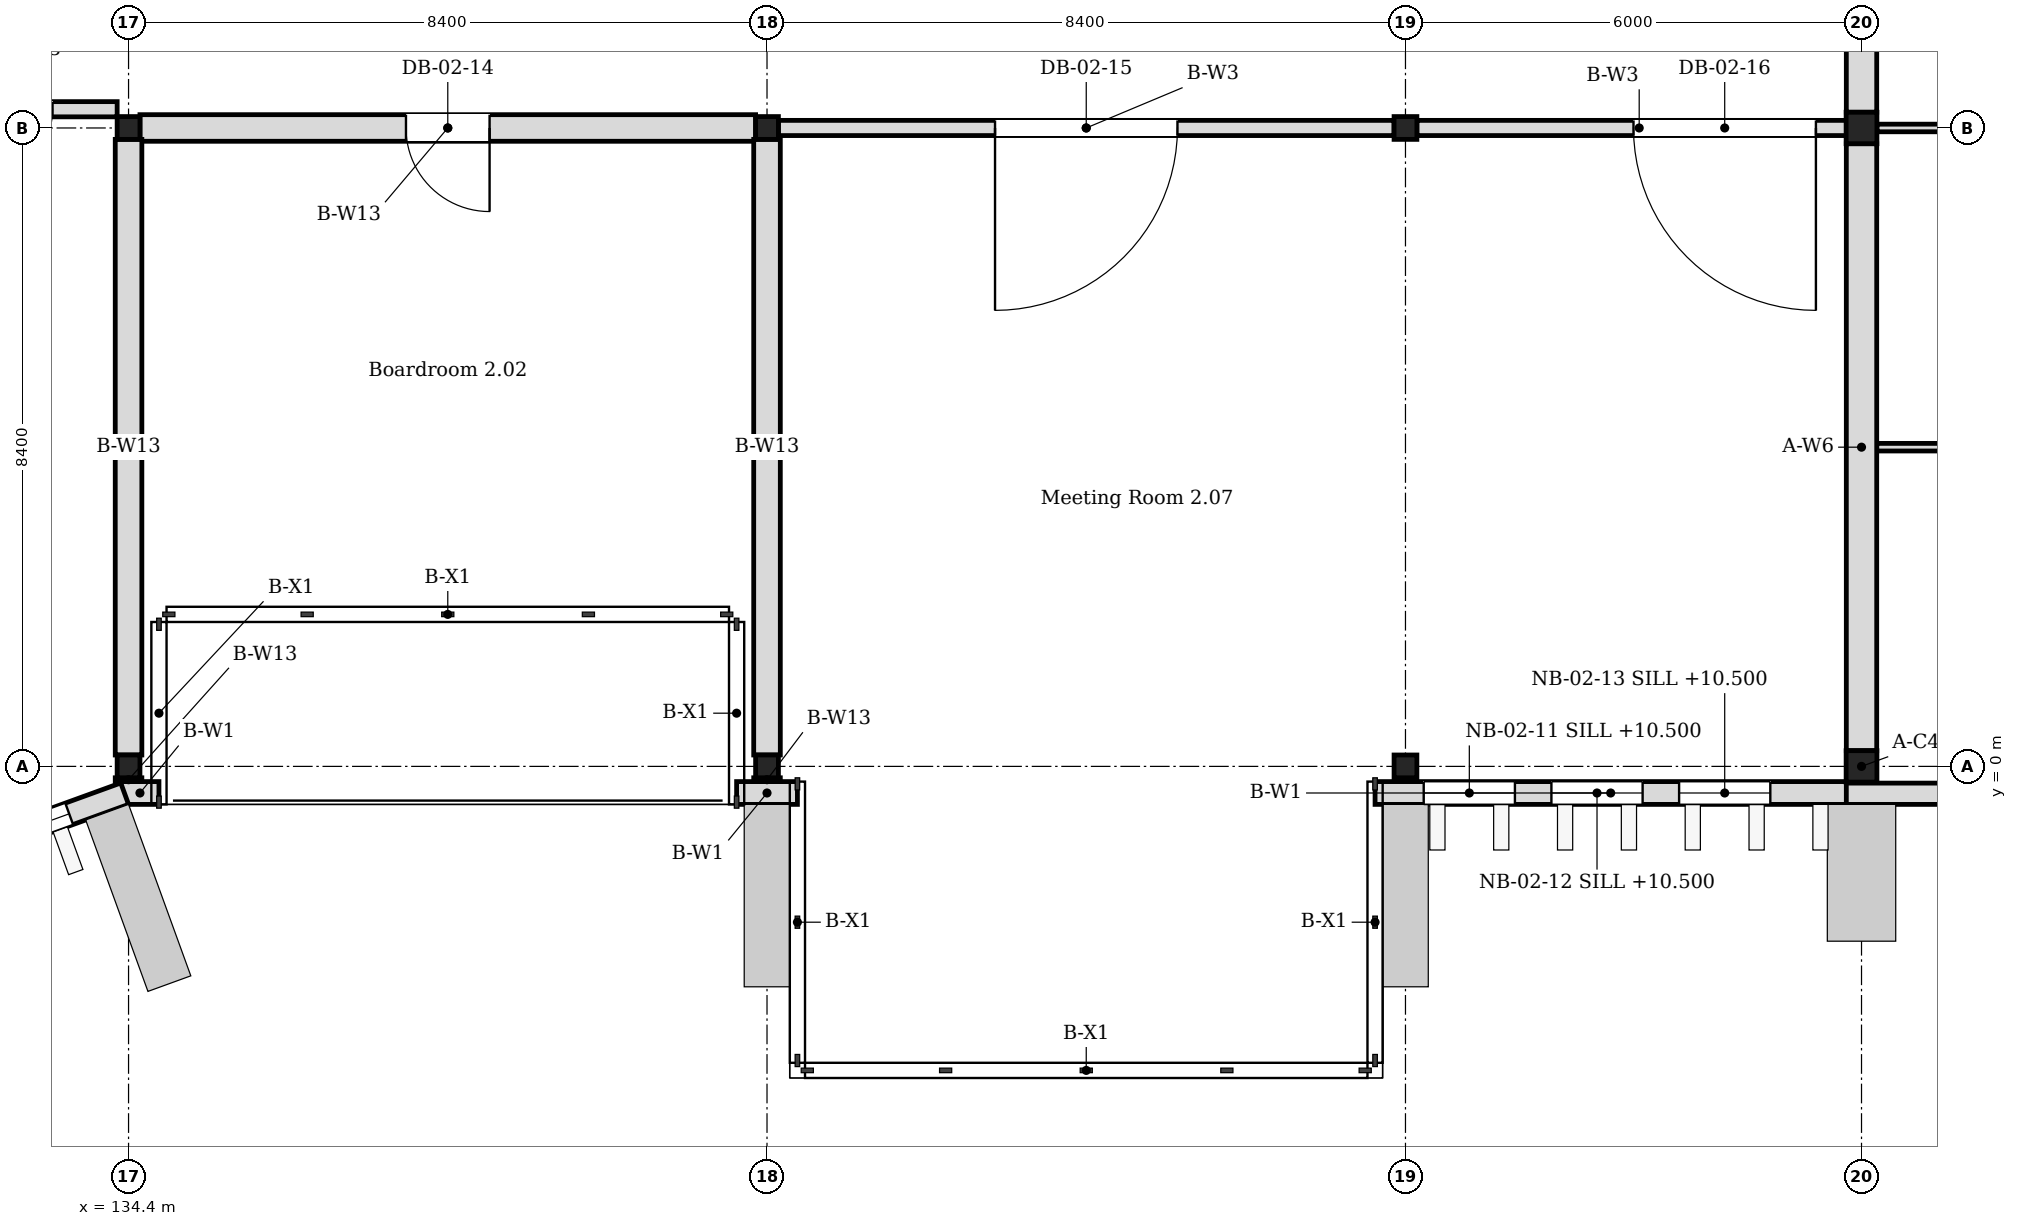
"""IFC4 building model, lengths in metres.
Left out: names, types, materials, properties, quantities, classifications, styles, units other than length and angle.
Written with IfcOpenShell. Run it as: python <this file> out.ifc"""

import sys

from ifc_helpers import new_model, si_unit, direction, frame, frame_2d, origin, origin_2d, place, context, subcontext, project, spatial, rectangle, i_section, extrude, element, fill, save


model = new_model("IFC4")
c1 = context("Model", 3, precision=1e-05, world=origin(), true_north=direction((0.0, 1.0)))
c2 = subcontext(c1, "Body", "Model", "MODEL_VIEW")
j1 = project(units=[si_unit("LENGTHUNIT", "METRE"), si_unit("PLANEANGLEUNIT", "RADIAN")], contexts=[c1])
p1 = place(None, origin())
s1 = spatial("IfcSite", under=j1, at=p1, CompositionType="ELEMENT")
p2 = place(p1, origin())
s2 = spatial("IfcBuilding", under=s1, at=p2, CompositionType="ELEMENT")
p3 = place(p2, frame((0.0, 0.0, 10.2)))
s3 = spatial("IfcBuildingStorey", under=s2, at=p3, CompositionType="ELEMENT", Elevation=10.2)
for number, where, z_axis, x_axis in (
    (1, (157.2, 0.0, 0.0), (0.0, 0.0, 1.0), (1.0, 0.0, 0.0)),
    (2, (157.2, 8.4, 0.0), (0.0, 0.0, 1.0), (1.0, 0.0, 0.0)),
):
    element("IfcColumn", number, at=place(p3, frame(where, z_axis=z_axis, x_axis=x_axis)), inside=s3, PredefinedType="COLUMN", context=c2, shape_type="SweptSolid", body=[
        extrude(i_section(OverallWidth=0.405, OverallDepth=0.414, WebThickness=0.018, FlangeThickness=0.028, FilletRadius=0.022, at=origin_2d()), origin(), (0.0, 0.0, 1.0), 4.2),
    ])
for number, where, z_axis, x_axis in (
    (3, (134.4, 0.0, 0.0), (0.0, 0.0, 1.0), (1.0, 0.0, 0.0)),
    (4, (134.4, 8.4, 0.0), (0.0, 0.0, 1.0), (1.0, 0.0, 0.0)),
    (5, (142.8, 0.0, 0.0), (0.0, 0.0, 1.0), (1.0, 0.0, 0.0)),
    (6, (142.8, 8.4, 0.0), (0.0, 0.0, 1.0), (1.0, 0.0, 0.0)),
    (7, (151.2, 0.0, 0.0), (0.0, 0.0, 1.0), (1.0, 0.0, 0.0)),
    (8, (151.2, 8.4, 0.0), (0.0, 0.0, 1.0), (1.0, 0.0, 0.0)),
):
    element("IfcColumn", number, at=place(p3, frame(where, z_axis=z_axis, x_axis=x_axis)), inside=s3, PredefinedType="COLUMN", context=c2, shape_type="SweptSolid", body=[
        extrude(i_section(OverallWidth=0.3, OverallDepth=0.3, WebThickness=0.01, FlangeThickness=0.015, FilletRadius=0.013, at=origin_2d()), origin(), (0.0, 0.0, 1.0), 4.2),
    ])
p4 = place(p3, frame((156.7, -0.36, 0.0), z_axis=(0.0, 0.0, 1.0), x_axis=(1.0, 0.0, 0.0)))
e9 = element("IfcWall", 9, at=p4, inside=s3, PredefinedType="SOLIDWALL", context=c2, shape_type="SweptSolid", body=[
    extrude(rectangle(XDim=20.2, YDim=0.28, at=frame_2d((10.1, 0.0))), origin(), (0.0, 0.0, 1.0), 4.05),
])
p5 = place(p4, frame((9.26, 0.0, 0.6)))
e10 = element("IfcOpeningElement", 10, at=p5, cuts=e9, PredefinedType="OPENING", context=c2, shape_type="SweptSolid", body=[
    extrude(rectangle(XDim=1.68, YDim=2.4, at=frame_2d((0.84, 1.2))), frame((0.0, 0.15, 0.0), z_axis=(0.0, -1.0, 0.0), x_axis=(1.0, 0.0, 0.0)), (0.0, 0.0, 1.0), 0.3),
])
p6 = place(p4, frame((3.34, 0.0, 0.6)))
e11 = element("IfcOpeningElement", 11, at=p6, cuts=e9, PredefinedType="OPENING", context=c2, shape_type="SweptSolid", body=[
    extrude(rectangle(XDim=2.52, YDim=2.4, at=frame_2d((1.26, 1.2))), frame((0.0, 0.15, 0.0), z_axis=(0.0, -1.0, 0.0), x_axis=(1.0, 0.0, 0.0)), (0.0, 0.0, 1.0), 0.3),
])
p7 = place(p3, frame((134.3, -0.35, 0.0), z_axis=(0.0, 0.0, 1.0), x_axis=(1.0, 0.0, 0.0)))
e12 = element("IfcWall", 12, at=p7, inside=s3, PredefinedType="SOLIDWALL", context=c2, shape_type="SweptSolid", body=[
    extrude(rectangle(XDim=0.5, YDim=0.3, at=frame_2d((0.25, 0.0))), origin(), (0.0, 0.0, 1.0), 4.05),
])
p8 = place(p3, frame((142.4, -0.35, 0.0), z_axis=(0.0, 0.0, 1.0), x_axis=(1.0, 0.0, 0.0)))
e13 = element("IfcWall", 13, at=p8, inside=s3, PredefinedType="SOLIDWALL", context=c2, shape_type="SweptSolid", body=[
    extrude(rectangle(XDim=0.8, YDim=0.3, at=frame_2d((0.4, 0.0))), origin(), (0.0, 0.0, 1.0), 4.05),
])
p9 = place(p3, frame((150.8, -0.35, 0.0), z_axis=(0.0, 0.0, 1.0), x_axis=(1.0, 0.0, 0.0)))
e14 = element("IfcWall", 14, at=p9, inside=s3, PredefinedType="SOLIDWALL", context=c2, shape_type="SweptSolid", body=[
    extrude(rectangle(XDim=6.2, YDim=0.3, at=frame_2d((3.1, 0.0))), origin(), (0.0, 0.0, 1.0), 4.05),
])
p10 = place(p9, frame((0.64, 0.0, 0.3)))
e15 = element("IfcOpeningElement", 15, at=p10, cuts=e14, PredefinedType="OPENING", context=c2, shape_type="SweptSolid", body=[
    extrude(rectangle(XDim=1.2, YDim=3.3, at=frame_2d((0.6, 1.65))), frame((0.0, 0.16, 0.0), z_axis=(0.0, -1.0, 0.0), x_axis=(1.0, 0.0, 0.0)), (0.0, 0.0, 1.0), 0.32),
])
p11 = place(p9, frame((2.32, 0.0, 0.3)))
e16 = element("IfcOpeningElement", 16, at=p11, cuts=e14, PredefinedType="OPENING", context=c2, shape_type="SweptSolid", body=[
    extrude(rectangle(XDim=1.2, YDim=3.3, at=frame_2d((0.6, 1.65))), frame((0.0, 0.16, 0.0), z_axis=(0.0, -1.0, 0.0), x_axis=(1.0, 0.0, 0.0)), (0.0, 0.0, 1.0), 0.32),
])
p12 = place(p9, frame((4.0, 0.0, 0.3)))
e17 = element("IfcOpeningElement", 17, at=p12, cuts=e14, PredefinedType="OPENING", context=c2, shape_type="SweptSolid", body=[
    extrude(rectangle(XDim=1.2, YDim=3.3, at=frame_2d((0.6, 1.65))), frame((0.0, 0.16, 0.0), z_axis=(0.0, -1.0, 0.0), x_axis=(1.0, 0.0, 0.0)), (0.0, 0.0, 1.0), 0.32),
])
p13 = place(p3, frame((126.05, -3.372, 0.0), z_axis=(0.0, 0.0, 1.0), x_axis=(0.939956409183, 0.3412945192, 0.0)))
e18 = element("IfcWall", 18, at=p13, inside=s3, PredefinedType="SOLIDWALL", context=c2, shape_type="SweptSolid", body=[
    extrude(rectangle(XDim=8.829, YDim=0.3, at=frame_2d((4.414, 0.0))), origin(), (0.0, 0.0, 1.0), 4.05),
])
p14 = place(p13, frame((0.132, 0.0, 0.3)))
e19 = element("IfcOpeningElement", 19, at=p14, cuts=e18, PredefinedType="OPENING", context=c2, shape_type="SweptSolid", body=[
    extrude(rectangle(XDim=1.2, YDim=3.3, at=frame_2d((0.6, 1.65))), frame((0.0, 0.16, 0.0), z_axis=(0.0, -1.0, 0.0), x_axis=(1.0, 0.0, 0.0)), (0.0, 0.0, 1.0), 0.32),
])
p15 = place(p13, frame((1.812, 0.0, 0.3)))
e20 = element("IfcOpeningElement", 20, at=p15, cuts=e18, PredefinedType="OPENING", context=c2, shape_type="SweptSolid", body=[
    extrude(rectangle(XDim=1.2, YDim=3.3, at=frame_2d((0.6, 1.65))), frame((0.0, 0.16, 0.0), z_axis=(0.0, -1.0, 0.0), x_axis=(1.0, 0.0, 0.0)), (0.0, 0.0, 1.0), 0.32),
])
p16 = place(p13, frame((3.492, 0.0, 0.3)))
e21 = element("IfcOpeningElement", 21, at=p16, cuts=e18, PredefinedType="OPENING", context=c2, shape_type="SweptSolid", body=[
    extrude(rectangle(XDim=1.2, YDim=3.3, at=frame_2d((0.6, 1.65))), frame((0.0, 0.16, 0.0), z_axis=(0.0, -1.0, 0.0), x_axis=(1.0, 0.0, 0.0)), (0.0, 0.0, 1.0), 0.32),
])
p17 = place(p13, frame((5.172, 0.0, 0.3)))
e22 = element("IfcOpeningElement", 22, at=p17, cuts=e18, PredefinedType="OPENING", context=c2, shape_type="SweptSolid", body=[
    extrude(rectangle(XDim=1.2, YDim=3.3, at=frame_2d((0.6, 1.65))), frame((0.0, 0.16, 0.0), z_axis=(0.0, -1.0, 0.0), x_axis=(1.0, 0.0, 0.0)), (0.0, 0.0, 1.0), 0.32),
])
p18 = place(p13, frame((6.852, 0.0, 0.3)))
e23 = element("IfcOpeningElement", 23, at=p18, cuts=e18, PredefinedType="OPENING", context=c2, shape_type="SweptSolid", body=[
    extrude(rectangle(XDim=1.2, YDim=3.3, at=frame_2d((0.6, 1.65))), frame((0.0, 0.16, 0.0), z_axis=(0.0, -1.0, 0.0), x_axis=(1.0, 0.0, 0.0)), (0.0, 0.0, 1.0), 0.32),
])
p19 = place(p3, frame((157.403, 8.4, 0.0), z_axis=(0.0, 0.0, 1.0), x_axis=(1.0, 0.0, 0.0)))
e24 = element("IfcWall", 24, at=p19, inside=s3, PredefinedType="PARTITIONING", context=c2, shape_type="SweptSolid", body=[
    extrude(rectangle(XDim=7.995, YDim=0.1, at=frame_2d((3.998, 0.0))), origin(), (0.0, 0.0, 1.0), 3.604),
])
p20 = place(p3, frame((157.4, 4.2, 0.0), z_axis=(0.0, 0.0, 1.0), x_axis=(1.0, 0.0, 0.0)))
e25 = element("IfcWall", 25, at=p20, inside=s3, PredefinedType="PARTITIONING", context=c2, shape_type="SweptSolid", body=[
    extrude(rectangle(XDim=8.1, YDim=0.1, at=frame_2d((4.05, 0.0))), origin(), (0.0, 0.0, 1.0), 3.604),
])
for number, where, z_axis, x_axis in (
    (26, (157.2, 0.207, 0.0), (0.0, 0.0, 1.0), (0.0, 1.0, 0.0)),
    (27, (157.2, 8.607, 0.0), (0.0, 0.0, 1.0), (0.0, 1.0, 0.0)),
):
    element("IfcWall", number, at=place(p3, frame(where, z_axis=z_axis, x_axis=x_axis)), inside=s3, PredefinedType="SOLIDWALL", context=c2, shape_type="SweptSolid", body=[
        extrude(rectangle(XDim=7.986, YDim=0.4, at=frame_2d((3.993, 0.0))), origin(), (0.0, 0.0, 1.0), 3.45),
    ])
p21 = place(p3, frame((126.15, 8.646, 0.0), z_axis=(0.0, 0.0, 1.0), x_axis=(1.0, 0.0, 0.0)))
e28 = element("IfcWall", 28, at=p21, inside=s3, PredefinedType="PARTITIONING", context=c2, shape_type="SweptSolid", body=[
    extrude(rectangle(XDim=8.1, YDim=0.2, at=frame_2d((4.05, 0.0))), origin(), (0.0, 0.0, 1.0), 3.35),
])
p22 = place(p21, frame((6.25, 0.0, 0.0)))
e29 = element("IfcOpeningElement", 29, at=p22, cuts=e28, PredefinedType="OPENING", context=c2, shape_type="SweptSolid", body=[
    extrude(rectangle(XDim=1.0, YDim=2.1, at=frame_2d((0.5, 1.05))), frame((0.0, 0.11, 0.0), z_axis=(0.0, -1.0, 0.0), x_axis=(1.0, 0.0, 0.0)), (0.0, 0.0, 1.0), 0.22),
])
p23 = place(p3, frame((134.55, 8.4, 0.0), z_axis=(0.0, 0.0, 1.0), x_axis=(1.0, 0.0, 0.0)))
e30 = element("IfcWall", 30, at=p23, inside=s3, PredefinedType="PARTITIONING", context=c2, shape_type="SweptSolid", body=[
    extrude(rectangle(XDim=8.1, YDim=0.35, at=frame_2d((4.05, 0.0))), origin(), (0.0, 0.0, 1.0), 3.35),
])
p24 = place(p23, frame((3.5, 0.0, 0.0)))
e31 = element("IfcOpeningElement", 31, at=p24, cuts=e30, PredefinedType="OPENING", context=c2, shape_type="SweptSolid", body=[
    extrude(rectangle(XDim=1.1, YDim=2.4, at=frame_2d((0.55, 1.2))), frame((0.0, 0.185, 0.0), z_axis=(0.0, -1.0, 0.0), x_axis=(1.0, 0.0, 0.0)), (0.0, 0.0, 1.0), 0.37),
])
p25 = place(p3, frame((142.95, 8.4, 0.0), z_axis=(0.0, 0.0, 1.0), x_axis=(1.0, 0.0, 0.0)))
e32 = element("IfcWall", 32, at=p25, inside=s3, PredefinedType="PARTITIONING", context=c2, shape_type="SweptSolid", body=[
    extrude(rectangle(XDim=8.1, YDim=0.2, at=frame_2d((4.05, 0.0))), origin(), (0.0, 0.0, 1.0), 3.35),
])
p26 = place(p25, frame((2.85, 0.0, 0.0)))
e33 = element("IfcOpeningElement", 33, at=p26, cuts=e32, PredefinedType="OPENING", context=c2, shape_type="SweptSolid", body=[
    extrude(rectangle(XDim=2.4, YDim=2.2, at=frame_2d((1.2, 1.1))), frame((0.0, 0.11, 0.0), z_axis=(0.0, -1.0, 0.0), x_axis=(1.0, 0.0, 0.0)), (0.0, 0.0, 1.0), 0.22),
])
p27 = place(p3, frame((151.35, 8.4, 0.0), z_axis=(0.0, 0.0, 1.0), x_axis=(1.0, 0.0, 0.0)))
e34 = element("IfcWall", 34, at=p27, inside=s3, PredefinedType="PARTITIONING", context=c2, shape_type="SweptSolid", body=[
    extrude(rectangle(XDim=5.85, YDim=0.2, at=frame_2d((2.925, 0.0))), origin(), (0.0, 0.0, 1.0), 3.35),
])
p28 = place(p27, frame((2.85, 0.0, 0.0)))
e35 = element("IfcOpeningElement", 35, at=p28, cuts=e34, PredefinedType="OPENING", context=c2, shape_type="SweptSolid", body=[
    extrude(rectangle(XDim=2.4, YDim=2.2, at=frame_2d((1.2, 1.1))), frame((0.0, 0.11, 0.0), z_axis=(0.0, -1.0, 0.0), x_axis=(1.0, 0.0, 0.0)), (0.0, 0.0, 1.0), 0.22),
])
p29 = place(p3, frame((134.4, -0.2, 0.0), z_axis=(0.0, 0.0, 1.0), x_axis=(0.0, 1.0, 0.0)))
e36 = element("IfcWall", 36, at=p29, inside=s3, PredefinedType="PARTITIONING", context=c2, shape_type="SweptSolid", body=[
    extrude(rectangle(XDim=0.05, YDim=0.35, at=frame_2d((0.025, 0.0))), origin(), (0.0, 0.0, 1.0), 3.35),
])
p30 = place(p3, frame((134.4, 0.15, 0.0), z_axis=(0.0, 0.0, 1.0), x_axis=(0.0, 1.0, 0.0)))
e37 = element("IfcWall", 37, at=p30, inside=s3, PredefinedType="PARTITIONING", context=c2, shape_type="SweptSolid", body=[
    extrude(rectangle(XDim=8.1, YDim=0.35, at=frame_2d((4.05, 0.0))), origin(), (0.0, 0.0, 1.0), 3.35),
])
p31 = place(p3, frame((142.8, -0.2, 0.0), z_axis=(0.0, 0.0, 1.0), x_axis=(0.0, 1.0, 0.0)))
e38 = element("IfcWall", 38, at=p31, inside=s3, PredefinedType="PARTITIONING", context=c2, shape_type="SweptSolid", body=[
    extrude(rectangle(XDim=0.05, YDim=0.35, at=frame_2d((0.025, 0.0))), origin(), (0.0, 0.0, 1.0), 3.35),
])
p32 = place(p3, frame((142.8, 0.15, 0.0), z_axis=(0.0, 0.0, 1.0), x_axis=(0.0, 1.0, 0.0)))
e39 = element("IfcWall", 39, at=p32, inside=s3, PredefinedType="PARTITIONING", context=c2, shape_type="SweptSolid", body=[
    extrude(rectangle(XDim=8.1, YDim=0.35, at=frame_2d((4.05, 0.0))), origin(), (0.0, 0.0, 1.0), 3.35),
])
p33 = place(p10, origin())
e40 = element("IfcWindow", 40, at=p33, inside=s3, PartitioningType="TRIPLE_PANEL_VERTICAL", PredefinedType="WINDOW", context=c2, shape_type="SweptSolid", body=[
    extrude(rectangle(XDim=1.2, YDim=3.3, at=frame_2d((0.6, 1.65))), frame((0.0, 0.03, 0.0), z_axis=(0.0, -1.0, 0.0), x_axis=(1.0, 0.0, 0.0)), (0.0, 0.0, 1.0), 0.06),
])
fill(e15, e40)
p34 = place(p11, origin())
e41 = element("IfcWindow", 41, at=p34, inside=s3, PartitioningType="TRIPLE_PANEL_VERTICAL", PredefinedType="WINDOW", context=c2, shape_type="SweptSolid", body=[
    extrude(rectangle(XDim=1.2, YDim=3.3, at=frame_2d((0.6, 1.65))), frame((0.0, 0.03, 0.0), z_axis=(0.0, -1.0, 0.0), x_axis=(1.0, 0.0, 0.0)), (0.0, 0.0, 1.0), 0.06),
])
fill(e16, e41)
p35 = place(p12, origin())
e42 = element("IfcWindow", 42, at=p35, inside=s3, PartitioningType="TRIPLE_PANEL_VERTICAL", PredefinedType="WINDOW", context=c2, shape_type="SweptSolid", body=[
    extrude(rectangle(XDim=1.2, YDim=3.3, at=frame_2d((0.6, 1.65))), frame((0.0, 0.03, 0.0), z_axis=(0.0, -1.0, 0.0), x_axis=(1.0, 0.0, 0.0)), (0.0, 0.0, 1.0), 0.06),
])
fill(e17, e42)
p36 = place(p18, origin())
e43 = element("IfcWindow", 43, at=p36, inside=s3, PartitioningType="TRIPLE_PANEL_VERTICAL", PredefinedType="WINDOW", context=c2, shape_type="SweptSolid", body=[
    extrude(rectangle(XDim=1.2, YDim=3.3, at=frame_2d((0.6, 1.65))), frame((0.0, 0.03, 0.0), z_axis=(0.0, -1.0, 0.0), x_axis=(1.0, 0.0, 0.0)), (0.0, 0.0, 1.0), 0.06),
])
fill(e23, e43)
p37 = place(p24, origin())
e44 = element("IfcDoor", 44, at=p37, inside=s3, OperationType="SINGLE_SWING_LEFT", PredefinedType="DOOR", context=c2, shape_type="SweptSolid", body=[
    extrude(rectangle(XDim=1.1, YDim=2.4, at=frame_2d((0.55, 1.2))), frame((0.0, 0.025, 0.0), z_axis=(0.0, -1.0, 0.0), x_axis=(1.0, 0.0, 0.0)), (0.0, 0.0, 1.0), 0.05),
])
fill(e31, e44)
p38 = place(p26, origin())
e45 = element("IfcDoor", 45, at=p38, inside=s3, OperationType="DOUBLE_DOOR_SINGLE_SWING", PredefinedType="DOOR", context=c2, shape_type="SweptSolid", body=[
    extrude(rectangle(XDim=2.4, YDim=2.2, at=frame_2d((1.2, 1.1))), frame((0.0, 0.025, 0.0), z_axis=(0.0, -1.0, 0.0), x_axis=(1.0, 0.0, 0.0)), (0.0, 0.0, 1.0), 0.05),
])
fill(e33, e45)
p39 = place(p28, origin())
e46 = element("IfcDoor", 46, at=p39, inside=s3, OperationType="DOUBLE_DOOR_SINGLE_SWING", PredefinedType="DOOR", context=c2, shape_type="SweptSolid", body=[
    extrude(rectangle(XDim=2.4, YDim=2.2, at=frame_2d((1.2, 1.1))), frame((0.0, 0.025, 0.0), z_axis=(0.0, -1.0, 0.0), x_axis=(1.0, 0.0, 0.0)), (0.0, 0.0, 1.0), 0.05),
])
fill(e35, e46)
save(model, sys.argv[1])
